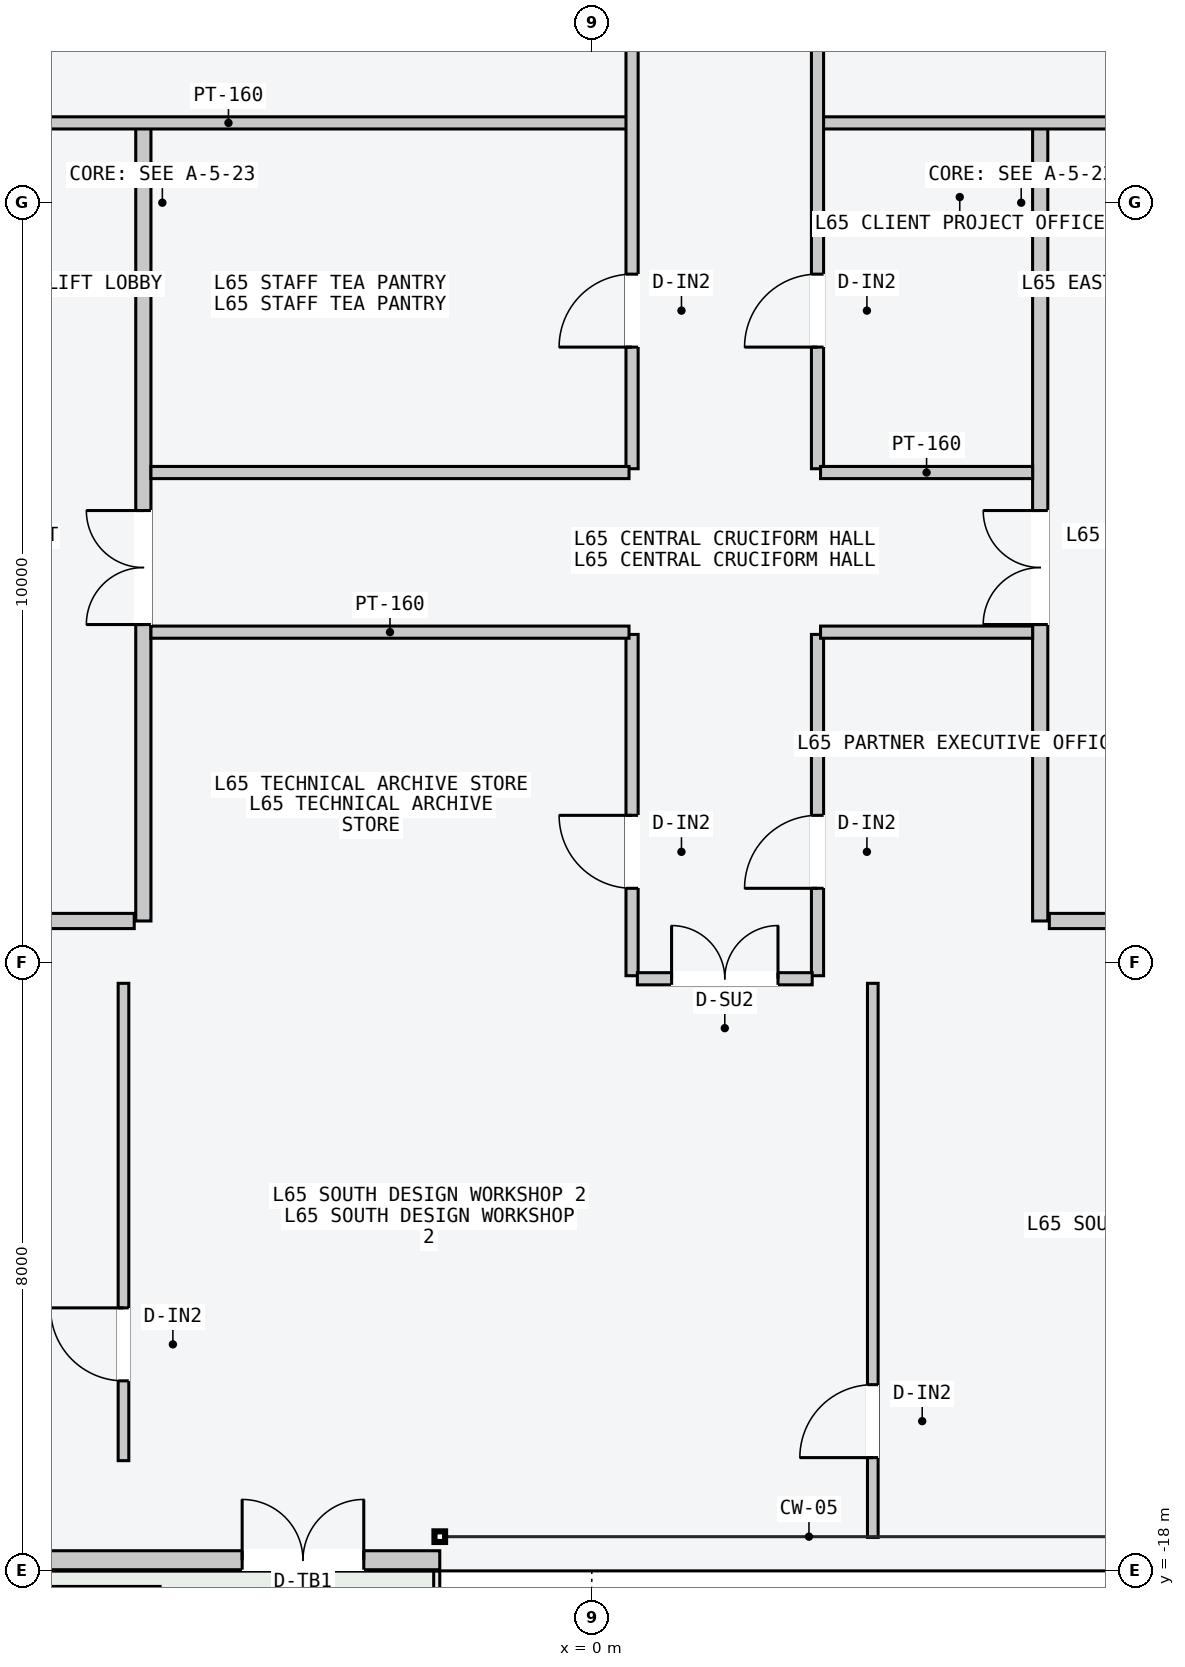
"""IFC4 building model, lengths in metres.
Left out: names, types, materials, properties, quantities, classifications, styles, units other than length and angle.
Written with IfcOpenShell. Run it as: python <this file> out.ifc"""

import sys

from ifc_helpers import new_model, si_unit, direction, frame, frame_2d, origin, place, context, subcontext, project, spatial, rectangle, extrude, element, fill, save


model = new_model("IFC4")
c1 = context("Model", 3, precision=1e-05, world=origin(), true_north=direction((0.0, 1.0)))
c2 = subcontext(c1, "Body", "Model", "MODEL_VIEW")
j1 = project(units=[si_unit("LENGTHUNIT", "METRE"), si_unit("PLANEANGLEUNIT", "RADIAN")], contexts=[c1])
p1 = place(None, origin())
s1 = spatial("IfcSite", under=j1, at=p1, CompositionType="ELEMENT")
p2 = place(p1, origin())
s2 = spatial("IfcBuilding", under=s1, at=p2, CompositionType="ELEMENT")
p3 = place(p2, frame((0.0, 0.0, 247.2)))
s3 = spatial("IfcBuildingStorey", under=s2, at=p3, CompositionType="ELEMENT", Elevation=247.2)
p4 = place(p3, frame((-7.705, -17.86, 0.0), z_axis=(0.0, 0.0, 1.0), x_axis=(1.0, 0.0, 0.0)))
e1 = element("IfcWall", 1, at=p4, inside=s3, PredefinedType="STANDARD", context=c2, shape_type="SweptSolid", body=[
    extrude(rectangle(XDim=5.705, YDim=0.25, at=frame_2d((2.853, 0.0))), origin(), (0.0, 0.0, 1.0), 3.4),
])
p5 = place(p4, frame((3.105, 0.0, 0.0)))
e2 = element("IfcOpeningElement", 2, at=p5, cuts=e1, PredefinedType="OPENING", context=c2, shape_type="SweptSolid", body=[
    extrude(rectangle(XDim=1.6, YDim=2.2, at=frame_2d((0.8, 1.1))), frame((0.0, 0.135, 0.0), z_axis=(0.0, -1.0, 0.0), x_axis=(1.0, 0.0, 0.0)), (0.0, 0.0, 1.0), 0.27),
])
p6 = place(p3, frame((-5.9, -9.45, 0.0), z_axis=(0.0, 0.0, 1.0), x_axis=(0.0, 1.0, 0.0)))
e3 = element("IfcWall", 3, at=p6, inside=s3, PredefinedType="PARTITIONING", context=c2, shape_type="SweptSolid", body=[
    extrude(rectangle(XDim=10.5, YDim=0.2, at=frame_2d((5.25, 0.0))), origin(), (0.0, 0.0, 1.0), 3.4),
])
p7 = place(p6, frame((3.9, 0.0, 0.0)))
e4 = element("IfcOpeningElement", 4, at=p7, cuts=e3, PredefinedType="OPENING", context=c2, shape_type="SweptSolid", body=[
    extrude(rectangle(XDim=1.5, YDim=2.2, at=frame_2d((0.75, 1.1))), frame((0.0, 0.11, 0.0), z_axis=(0.0, -1.0, 0.0), x_axis=(1.0, 0.0, 0.0)), (0.0, 0.0, 1.0), 0.22),
])
p8 = place(p3, frame((-6.02, -9.45, 0.0), z_axis=(0.0, 0.0, 1.0), x_axis=(-1.0, 0.0, 0.0)))
e5 = element("IfcWall", 5, at=p8, inside=s3, PredefinedType="PARTITIONING", context=c2, shape_type="SweptSolid", body=[
    extrude(rectangle(XDim=1.8, YDim=0.2, at=frame_2d((0.9, 0.0))), origin(), (0.0, 0.0, 1.0), 3.4),
])
p9 = place(p3, frame((5.9, -9.45, 0.0), z_axis=(0.0, 0.0, 1.0), x_axis=(0.0, 1.0, 0.0)))
e6 = element("IfcWall", 6, at=p9, inside=s3, PredefinedType="PARTITIONING", context=c2, shape_type="SweptSolid", body=[
    extrude(rectangle(XDim=10.5, YDim=0.2, at=frame_2d((5.25, 0.0))), origin(), (0.0, 0.0, 1.0), 3.4),
])
p10 = place(p9, frame((3.9, 0.0, 0.0)))
e7 = element("IfcOpeningElement", 7, at=p10, cuts=e6, PredefinedType="OPENING", context=c2, shape_type="SweptSolid", body=[
    extrude(rectangle(XDim=1.5, YDim=2.2, at=frame_2d((0.75, 1.1))), frame((0.0, 0.11, 0.0), z_axis=(0.0, -1.0, 0.0), x_axis=(1.0, 0.0, 0.0)), (0.0, 0.0, 1.0), 0.22),
])
p11 = place(p3, frame((6.02, -9.45, 0.0), z_axis=(0.0, 0.0, 1.0), x_axis=(1.0, 0.0, 0.0)))
e8 = element("IfcWall", 8, at=p11, inside=s3, PredefinedType="PARTITIONING", context=c2, shape_type="SweptSolid", body=[
    extrude(rectangle(XDim=1.8, YDim=0.2, at=frame_2d((0.9, 0.0))), origin(), (0.0, 0.0, 1.0), 3.4),
])
p12 = place(p3, frame((-10.05, 1.05, 0.0), z_axis=(0.0, 0.0, 1.0), x_axis=(1.0, 0.0, 0.0)))
e9 = element("IfcWall", 9, at=p12, inside=s3, PredefinedType="PARTITIONING", context=c2, shape_type="SweptSolid", body=[
    extrude(rectangle(XDim=10.54, YDim=0.16, at=frame_2d((5.27, 0.0))), origin(), (0.0, 0.0, 1.0), 3.4),
])
p13 = place(p3, frame((0.53, -3.5, 0.0), z_axis=(0.0, 0.0, 1.0), x_axis=(0.0, 1.0, 0.0)))
e10 = element("IfcWall", 10, at=p13, inside=s3, PredefinedType="PARTITIONING", context=c2, shape_type="SweptSolid", body=[
    extrude(rectangle(XDim=13.36, YDim=0.16, at=frame_2d((6.68, 0.0))), origin(), (0.0, 0.0, 1.0), 3.4),
])
p14 = place(p13, frame((6.1, 0.0, 0.0)))
e11 = element("IfcOpeningElement", 11, at=p14, cuts=e10, PredefinedType="OPENING", context=c2, shape_type="SweptSolid", body=[
    extrude(rectangle(XDim=1.24, YDim=2.24, at=frame_2d((0.62, 1.12))), frame((0.0, 0.09, 0.0), z_axis=(0.0, -1.0, 0.0), x_axis=(1.0, 0.0, 0.0)), (0.0, 0.0, 1.0), 0.18),
])
p15 = place(p13, frame((1.6, 0.0, 0.0)))
e12 = element("IfcOpeningElement", 12, at=p15, cuts=e10, PredefinedType="OPENING", context=c2, shape_type="SweptSolid", body=[
    extrude(rectangle(XDim=0.96, YDim=2.18, at=frame_2d((0.48, 1.09))), frame((0.0, 0.09, 0.0), z_axis=(0.0, -1.0, 0.0), x_axis=(1.0, 0.0, 0.0)), (0.0, 0.0, 1.0), 0.18),
])
p16 = place(p3, frame((-5.8, -3.55, 0.0), z_axis=(0.0, 0.0, 1.0), x_axis=(1.0, 0.0, 0.0)))
e13 = element("IfcWall", 13, at=p16, inside=s3, PredefinedType="PARTITIONING", context=c2, shape_type="SweptSolid", body=[
    extrude(rectangle(XDim=6.29, YDim=0.16, at=frame_2d((3.145, 0.0))), origin(), (0.0, 0.0, 1.0), 3.4),
])
p17 = place(p3, frame((3.01, 1.05, 0.0), z_axis=(0.0, 0.0, 1.0), x_axis=(1.0, 0.0, 0.0)))
e14 = element("IfcWall", 14, at=p17, inside=s3, PredefinedType="PARTITIONING", context=c2, shape_type="SweptSolid", body=[
    extrude(rectangle(XDim=7.05, YDim=0.16, at=frame_2d((3.525, 0.0))), origin(), (0.0, 0.0, 1.0), 3.4),
])
p18 = place(p3, frame((2.97, -3.5, 0.0), z_axis=(0.0, 0.0, 1.0), x_axis=(0.0, 1.0, 0.0)))
e15 = element("IfcWall", 15, at=p18, inside=s3, PredefinedType="PARTITIONING", context=c2, shape_type="SweptSolid", body=[
    extrude(rectangle(XDim=13.36, YDim=0.16, at=frame_2d((6.68, 0.0))), origin(), (0.0, 0.0, 1.0), 3.4),
])
p19 = place(p18, frame((6.1, 0.0, 0.0)))
e16 = element("IfcOpeningElement", 16, at=p19, cuts=e15, PredefinedType="OPENING", context=c2, shape_type="SweptSolid", body=[
    extrude(rectangle(XDim=1.24, YDim=2.24, at=frame_2d((0.62, 1.12))), frame((0.0, 0.09, 0.0), z_axis=(0.0, -1.0, 0.0), x_axis=(1.0, 0.0, 0.0)), (0.0, 0.0, 1.0), 0.18),
])
p20 = place(p18, frame((1.6, 0.0, 0.0)))
e17 = element("IfcOpeningElement", 17, at=p20, cuts=e15, PredefinedType="OPENING", context=c2, shape_type="SweptSolid", body=[
    extrude(rectangle(XDim=0.96, YDim=2.18, at=frame_2d((0.48, 1.09))), frame((0.0, 0.09, 0.0), z_axis=(0.0, -1.0, 0.0), x_axis=(1.0, 0.0, 0.0)), (0.0, 0.0, 1.0), 0.18),
])
p21 = place(p3, frame((3.01, -3.55, 0.0), z_axis=(0.0, 0.0, 1.0), x_axis=(1.0, 0.0, 0.0)))
e18 = element("IfcWall", 18, at=p21, inside=s3, PredefinedType="PARTITIONING", context=c2, shape_type="SweptSolid", body=[
    extrude(rectangle(XDim=2.79, YDim=0.16, at=frame_2d((1.395, 0.0))), origin(), (0.0, 0.0, 1.0), 3.4),
])
p22 = place(p3, frame((0.53, -10.17, 0.0), z_axis=(0.0, 0.0, 1.0), x_axis=(0.0, 1.0, 0.0)))
e19 = element("IfcWall", 19, at=p22, inside=s3, PredefinedType="PARTITIONING", context=c2, shape_type="SweptSolid", body=[
    extrude(rectangle(XDim=4.49, YDim=0.16, at=frame_2d((2.245, 0.0))), origin(), (0.0, 0.0, 1.0), 3.4),
])
p23 = place(p22, frame((1.15, 0.0, 0.0)))
e20 = element("IfcOpeningElement", 20, at=p23, cuts=e19, PredefinedType="OPENING", context=c2, shape_type="SweptSolid", body=[
    extrude(rectangle(XDim=0.96, YDim=2.18, at=frame_2d((0.48, 1.09))), frame((0.0, 0.09, 0.0), z_axis=(0.0, -1.0, 0.0), x_axis=(1.0, 0.0, 0.0)), (0.0, 0.0, 1.0), 0.18),
])
p24 = place(p3, frame((2.97, -10.17, 0.0), z_axis=(0.0, 0.0, 1.0), x_axis=(0.0, 1.0, 0.0)))
e21 = element("IfcWall", 21, at=p24, inside=s3, PredefinedType="PARTITIONING", context=c2, shape_type="SweptSolid", body=[
    extrude(rectangle(XDim=4.49, YDim=0.16, at=frame_2d((2.245, 0.0))), origin(), (0.0, 0.0, 1.0), 3.4),
])
p25 = place(p24, frame((1.15, 0.0, 0.0)))
e22 = element("IfcOpeningElement", 22, at=p25, cuts=e21, PredefinedType="OPENING", context=c2, shape_type="SweptSolid", body=[
    extrude(rectangle(XDim=0.96, YDim=2.18, at=frame_2d((0.48, 1.09))), frame((0.0, 0.09, 0.0), z_axis=(0.0, -1.0, 0.0), x_axis=(1.0, 0.0, 0.0)), (0.0, 0.0, 1.0), 0.18),
])
p26 = place(p3, frame((-5.8, -5.65, 0.0), z_axis=(0.0, 0.0, 1.0), x_axis=(1.0, 0.0, 0.0)))
e23 = element("IfcWall", 23, at=p26, inside=s3, PredefinedType="PARTITIONING", context=c2, shape_type="SweptSolid", body=[
    extrude(rectangle(XDim=6.29, YDim=0.16, at=frame_2d((3.145, 0.0))), origin(), (0.0, 0.0, 1.0), 3.4),
])
p27 = place(p3, frame((3.01, -5.65, 0.0), z_axis=(0.0, 0.0, 1.0), x_axis=(1.0, 0.0, 0.0)))
e24 = element("IfcWall", 24, at=p27, inside=s3, PredefinedType="PARTITIONING", context=c2, shape_type="SweptSolid", body=[
    extrude(rectangle(XDim=2.79, YDim=0.16, at=frame_2d((1.395, 0.0))), origin(), (0.0, 0.0, 1.0), 3.4),
])
p28 = place(p3, frame((-6.161, -16.55, 0.0), z_axis=(0.0, 0.0, 1.0), x_axis=(0.0, 1.0, 0.0)))
e25 = element("IfcWall", 25, at=p28, inside=s3, PredefinedType="PARTITIONING", context=c2, shape_type="SweptSolid", body=[
    extrude(rectangle(XDim=6.28, YDim=0.14, at=frame_2d((3.14, 0.0))), origin(), (0.0, 0.0, 1.0), 3.4),
])
p29 = place(p28, frame((1.05, 0.0, 0.0)))
e26 = element("IfcOpeningElement", 26, at=p29, cuts=e25, PredefinedType="OPENING", context=c2, shape_type="SweptSolid", body=[
    extrude(rectangle(XDim=0.96, YDim=2.18, at=frame_2d((0.48, 1.09))), frame((0.0, 0.08, 0.0), z_axis=(0.0, -1.0, 0.0), x_axis=(1.0, 0.0, 0.0)), (0.0, 0.0, 1.0), 0.16),
])
p30 = place(p3, frame((3.698, -17.56, 0.0), z_axis=(0.0, 0.0, 1.0), x_axis=(0.0, 1.0, 0.0)))
e27 = element("IfcWall", 27, at=p30, inside=s3, PredefinedType="PARTITIONING", context=c2, shape_type="SweptSolid", body=[
    extrude(rectangle(XDim=7.29, YDim=0.14, at=frame_2d((3.645, 0.0))), origin(), (0.0, 0.0, 1.0), 3.4),
])
p31 = place(p30, frame((1.05, 0.0, 0.0)))
e28 = element("IfcOpeningElement", 28, at=p31, cuts=e27, PredefinedType="OPENING", context=c2, shape_type="SweptSolid", body=[
    extrude(rectangle(XDim=0.96, YDim=2.18, at=frame_2d((0.48, 1.09))), frame((0.0, 0.08, 0.0), z_axis=(0.0, -1.0, 0.0), x_axis=(1.0, 0.0, 0.0)), (0.0, 0.0, 1.0), 0.16),
])
p32 = place(p3, frame((0.6, -10.21, 0.0), z_axis=(0.0, 0.0, 1.0), x_axis=(1.0, 0.0, 0.0)))
e29 = element("IfcWall", 29, at=p32, inside=s3, PredefinedType="PARTITIONING", context=c2, shape_type="SweptSolid", body=[
    extrude(rectangle(XDim=2.3, YDim=0.16, at=frame_2d((1.15, 0.0))), origin(), (0.0, 0.0, 1.0), 3.4),
])
p33 = place(p32, frame((0.45, 0.0, 0.0)))
e30 = element("IfcOpeningElement", 30, at=p33, cuts=e29, PredefinedType="OPENING", context=c2, shape_type="SweptSolid", body=[
    extrude(rectangle(XDim=1.4, YDim=2.2, at=frame_2d((0.7, 1.1))), frame((0.0, 0.09, 0.0), z_axis=(0.0, -1.0, 0.0), x_axis=(1.0, 0.0, 0.0)), (0.0, 0.0, 1.0), 0.18),
])
p34 = place(p5, origin())
e31 = element("IfcDoor", 31, at=p34, inside=s3, OperationType="DOUBLE_DOOR_SINGLE_SWING", PredefinedType="DOOR", context=c2, shape_type="SweptSolid", body=[
    extrude(rectangle(XDim=1.6, YDim=2.2, at=frame_2d((0.8, 1.1))), frame((0.0, 0.025, 0.0), z_axis=(0.0, -1.0, 0.0), x_axis=(1.0, 0.0, 0.0)), (0.0, 0.0, 1.0), 0.05),
])
fill(e2, e31)
p35 = place(p7, origin())
e32 = element("IfcDoor", 32, at=p35, inside=s3, OperationType="DOUBLE_DOOR_SINGLE_SWING", PredefinedType="DOOR", context=c2, shape_type="SweptSolid", body=[
    extrude(rectangle(XDim=1.5, YDim=2.2, at=frame_2d((0.75, 1.1))), frame((0.0, 0.025, 0.0), z_axis=(0.0, -1.0, 0.0), x_axis=(1.0, 0.0, 0.0)), (0.0, 0.0, 1.0), 0.05),
])
fill(e4, e32)
p36 = place(p10, origin())
e33 = element("IfcDoor", 33, at=p36, inside=s3, OperationType="DOUBLE_DOOR_SINGLE_SWING", PredefinedType="DOOR", context=c2, shape_type="SweptSolid", body=[
    extrude(rectangle(XDim=1.5, YDim=2.2, at=frame_2d((0.75, 1.1))), frame((0.0, 0.025, 0.0), z_axis=(0.0, -1.0, 0.0), x_axis=(1.0, 0.0, 0.0)), (0.0, 0.0, 1.0), 0.05),
])
fill(e7, e33)
p37 = place(p15, origin())
e34 = element("IfcDoor", 34, at=p37, inside=s3, OperationType="SINGLE_SWING_LEFT", PredefinedType="DOOR", context=c2, shape_type="SweptSolid", body=[
    extrude(rectangle(XDim=0.96, YDim=2.18, at=frame_2d((0.48, 1.09))), frame((0.0, 0.025, 0.0), z_axis=(0.0, -1.0, 0.0), x_axis=(1.0, 0.0, 0.0)), (0.0, 0.0, 1.0), 0.05),
])
fill(e12, e34)
p38 = place(p20, origin())
e35 = element("IfcDoor", 35, at=p38, inside=s3, OperationType="SINGLE_SWING_LEFT", PredefinedType="DOOR", context=c2, shape_type="SweptSolid", body=[
    extrude(rectangle(XDim=0.96, YDim=2.18, at=frame_2d((0.48, 1.09))), frame((0.0, 0.025, 0.0), z_axis=(0.0, -1.0, 0.0), x_axis=(1.0, 0.0, 0.0)), (0.0, 0.0, 1.0), 0.05),
])
fill(e17, e35)
p39 = place(p23, origin())
e36 = element("IfcDoor", 36, at=p39, inside=s3, OperationType="SINGLE_SWING_RIGHT", PredefinedType="DOOR", context=c2, shape_type="SweptSolid", body=[
    extrude(rectangle(XDim=0.96, YDim=2.18, at=frame_2d((0.48, 1.09))), frame((0.0, 0.025, 0.0), z_axis=(0.0, -1.0, 0.0), x_axis=(1.0, 0.0, 0.0)), (0.0, 0.0, 1.0), 0.05),
])
fill(e20, e36)
p40 = place(p25, origin())
e37 = element("IfcDoor", 37, at=p40, inside=s3, OperationType="SINGLE_SWING_LEFT", PredefinedType="DOOR", context=c2, shape_type="SweptSolid", body=[
    extrude(rectangle(XDim=0.96, YDim=2.18, at=frame_2d((0.48, 1.09))), frame((0.0, 0.025, 0.0), z_axis=(0.0, -1.0, 0.0), x_axis=(1.0, 0.0, 0.0)), (0.0, 0.0, 1.0), 0.05),
])
fill(e22, e37)
p41 = place(p29, origin())
e38 = element("IfcDoor", 38, at=p41, inside=s3, OperationType="SINGLE_SWING_RIGHT", PredefinedType="DOOR", context=c2, shape_type="SweptSolid", body=[
    extrude(rectangle(XDim=0.96, YDim=2.18, at=frame_2d((0.48, 1.09))), frame((0.0, 0.025, 0.0), z_axis=(0.0, -1.0, 0.0), x_axis=(1.0, 0.0, 0.0)), (0.0, 0.0, 1.0), 0.05),
])
fill(e26, e38)
p42 = place(p31, origin())
e39 = element("IfcDoor", 39, at=p42, inside=s3, OperationType="SINGLE_SWING_LEFT", PredefinedType="DOOR", context=c2, shape_type="SweptSolid", body=[
    extrude(rectangle(XDim=0.96, YDim=2.18, at=frame_2d((0.48, 1.09))), frame((0.0, 0.025, 0.0), z_axis=(0.0, -1.0, 0.0), x_axis=(1.0, 0.0, 0.0)), (0.0, 0.0, 1.0), 0.05),
])
fill(e28, e39)
p43 = place(p33, origin())
e40 = element("IfcDoor", 40, at=p43, inside=s3, OperationType="DOUBLE_DOOR_SINGLE_SWING", PredefinedType="DOOR", context=c2, shape_type="SweptSolid", body=[
    extrude(rectangle(XDim=1.4, YDim=2.2, at=frame_2d((0.7, 1.1))), frame((0.0, 0.025, 0.0), z_axis=(0.0, -1.0, 0.0), x_axis=(1.0, 0.0, 0.0)), (0.0, 0.0, 1.0), 0.05),
])
fill(e30, e40)
save(model, sys.argv[1])
